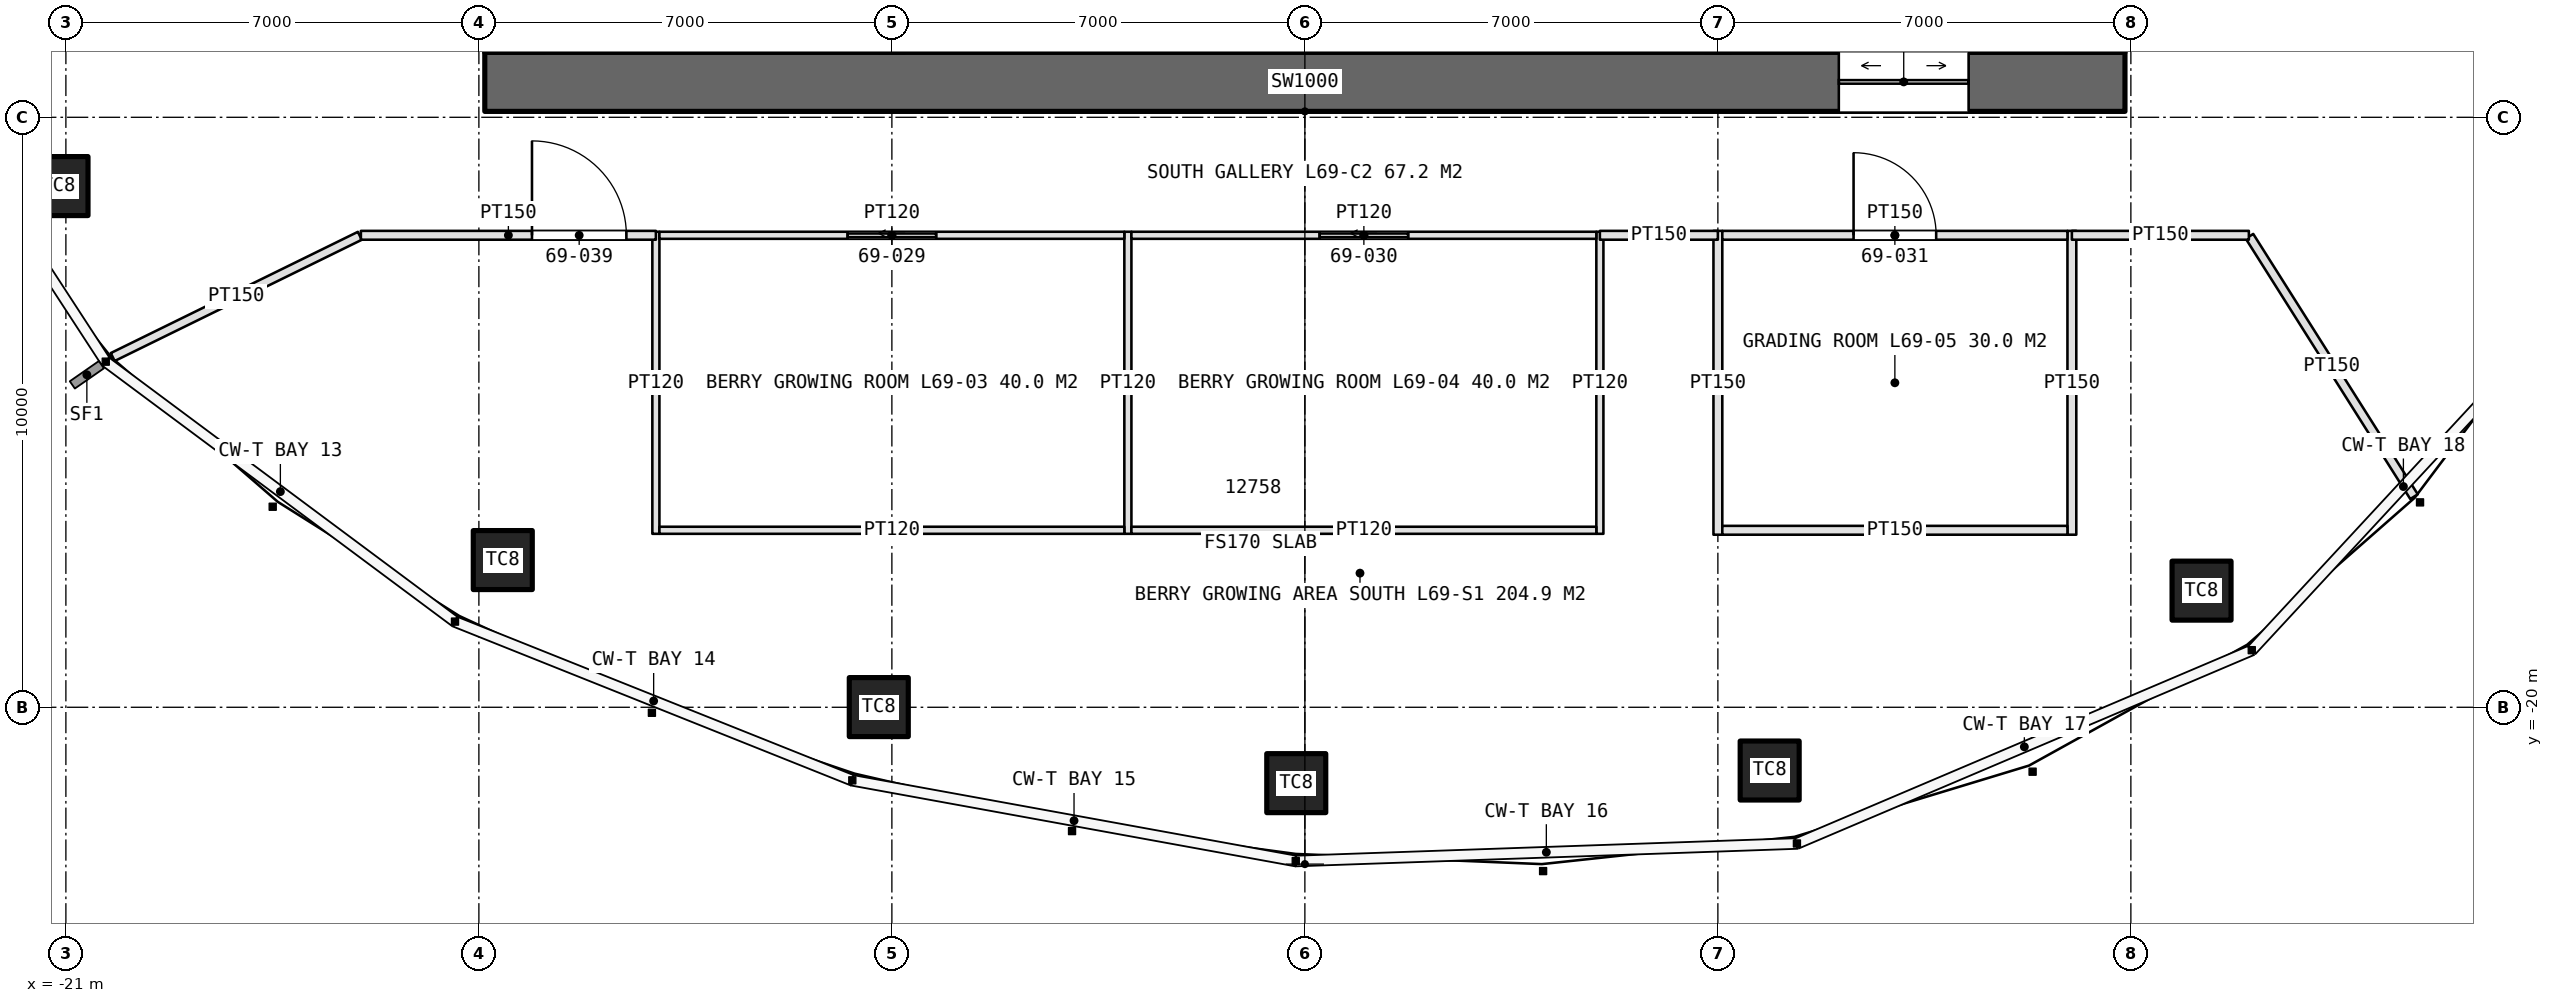
"""IFC4 building model, lengths in metres.
Left out: names, types, materials, properties, quantities, classifications, styles, units other than length and angle.
Written with IfcOpenShell. Run it as: python <this file> out.ifc"""

import sys

from ifc_helpers import new_model, si_unit, direction, frame, frame_2d, origin, origin_2d, place, context, subcontext, project, spatial, rectangle, extrude, element, fill, save


model = new_model("IFC4")
c1 = context("Model", 3, precision=1e-05, world=origin(), true_north=direction((0.0, 1.0)))
c2 = subcontext(c1, "Body", "Model", "MODEL_VIEW")
j1 = project(units=[si_unit("LENGTHUNIT", "METRE"), si_unit("PLANEANGLEUNIT", "RADIAN")], contexts=[c1])
p1 = place(None, origin())
s1 = spatial("IfcSite", under=j1, at=p1, CompositionType="ELEMENT")
p2 = place(p1, origin())
s2 = spatial("IfcBuilding", under=s1, at=p2, CompositionType="ELEMENT")
p3 = place(p2, frame((0.0, 0.0, 309.0)))
s3 = spatial("IfcBuildingStorey", under=s2, at=p3, CompositionType="ELEMENT", Elevation=309.0)
p4 = place(p3, frame((-13.9, -9.4, 0.0), z_axis=(0.0, 0.0, 1.0), x_axis=(1.0, 0.0, 0.0)))
e1 = element("IfcWall", 1, at=p4, inside=s3, PredefinedType="SHEAR", context=c2, shape_type="SweptSolid", body=[
    extrude(rectangle(XDim=27.8, YDim=1.0, at=frame_2d((13.9, 0.0))), origin(), (0.0, 0.0, 1.0), 4.2),
])
p5 = place(p4, frame((22.95, 0.0, 0.0)))
e2 = element("IfcOpeningElement", 2, at=p5, cuts=e1, PredefinedType="OPENING", context=c2, shape_type="SweptSolid", body=[
    extrude(rectangle(XDim=2.2, YDim=2.7, at=frame_2d((1.1, 1.35))), frame((0.0, 0.51, 0.0), z_axis=(0.0, -1.0, 0.0), x_axis=(1.0, 0.0, 0.0)), (0.0, 0.0, 1.0), 1.02),
])
for number, where, z_axis, x_axis in (
    (3, (-21.125, -11.166, 0.0), (0.0, 0.0, 1.0), (1.0, 0.0, 0.0)),
    (4, (-13.595, -17.505, 0.0), (0.0, 0.0, 1.0), (1.0, 0.0, 0.0)),
    (5, (-7.222, -19.997, 0.0), (0.0, 0.0, 1.0), (1.0, 0.0, 0.0)),
    (6, (-0.146, -21.286, 0.0), (0.0, 0.0, 1.0), (1.0, 0.0, 0.0)),
    (7, (7.878, -21.072, 0.0), (0.0, 0.0, 1.0), (1.0, 0.0, 0.0)),
    (8, (15.198, -18.023, 0.0), (0.0, 0.0, 1.0), (1.0, 0.0, 0.0)),
):
    element("IfcColumn", number, at=place(p3, frame(where, z_axis=z_axis, x_axis=x_axis)), inside=s3, PredefinedType="COLUMN", context=c2, shape_type="SweptSolid", body=[
        extrude(rectangle(XDim=1.0, YDim=1.0, at=origin_2d()), origin(), (0.0, 0.0, 1.0), 4.2),
    ])
for number, where, z_axis, x_axis in (
    (9, (-4.2, -4.7, 0.0), (0.0, 0.0, 1.0), (0.0, -1.0, 0.0)),
    (10, (-1.4, -4.7, 0.0), (0.0, 0.0, 1.0), (0.0, -1.0, 0.0)),
    (11, (1.4, -4.7, 0.0), (0.0, 0.0, 1.0), (0.0, -1.0, 0.0)),
    (12, (4.2, -4.7, 0.0), (0.0, 0.0, 1.0), (0.0, -1.0, 0.0)),
):
    element("IfcWall", number, at=place(p3, frame(where, z_axis=z_axis, x_axis=x_axis)), inside=s3, PredefinedType="PARTITIONING", context=c2, shape_type="SweptSolid", body=[
        extrude(rectangle(XDim=4.2, YDim=0.2, at=frame_2d((2.1, 0.0))), origin(), (0.0, 0.0, 1.0), 4.2),
    ])
for number, where, z_axis, x_axis in (
    (13, (-11.0, -11.94, 0.0), (0.0, 0.0, 1.0), (0.0, -1.0, 0.0)),
    (14, (-3.0, -11.94, 0.0), (0.0, 0.0, 1.0), (0.0, -1.0, 0.0)),
    (15, (5.0, -11.94, 0.0), (0.0, 0.0, 1.0), (0.0, -1.0, 0.0)),
):
    element("IfcWall", number, at=place(p3, frame(where, z_axis=z_axis, x_axis=x_axis)), inside=s3, PredefinedType="PARTITIONING", context=c2, shape_type="SweptSolid", body=[
        extrude(rectangle(XDim=5.12, YDim=0.12, at=frame_2d((2.56, 0.0))), origin(), (0.0, 0.0, 1.0), 3.0),
    ])
p6 = place(p3, frame((-10.94, -12.0, 0.0), z_axis=(0.0, 0.0, 1.0), x_axis=(1.0, 0.0, 0.0)))
e16 = element("IfcWall", 16, at=p6, inside=s3, PredefinedType="PARTITIONING", context=c2, shape_type="SweptSolid", body=[
    extrude(rectangle(XDim=7.88, YDim=0.12, at=frame_2d((3.94, 0.0))), origin(), (0.0, 0.0, 1.0), 3.0),
])
p7 = place(p6, frame((3.19, 0.0, 0.0)))
e17 = element("IfcOpeningElement", 17, at=p7, cuts=e16, PredefinedType="OPENING", context=c2, shape_type="SweptSolid", body=[
    extrude(rectangle(XDim=1.5, YDim=2.5, at=frame_2d((0.75, 1.25))), frame((0.0, 0.07, 0.0), z_axis=(0.0, -1.0, 0.0), x_axis=(1.0, 0.0, 0.0)), (0.0, 0.0, 1.0), 0.14),
])
p8 = place(p3, frame((-10.94, -17.0, 0.0), z_axis=(0.0, 0.0, 1.0), x_axis=(1.0, 0.0, 0.0)))
e18 = element("IfcWall", 18, at=p8, inside=s3, PredefinedType="PARTITIONING", context=c2, shape_type="SweptSolid", body=[
    extrude(rectangle(XDim=7.88, YDim=0.12, at=frame_2d((3.94, 0.0))), origin(), (0.0, 0.0, 1.0), 3.0),
])
p9 = place(p3, frame((-2.94, -12.0, 0.0), z_axis=(0.0, 0.0, 1.0), x_axis=(1.0, 0.0, 0.0)))
e19 = element("IfcWall", 19, at=p9, inside=s3, PredefinedType="PARTITIONING", context=c2, shape_type="SweptSolid", body=[
    extrude(rectangle(XDim=7.88, YDim=0.12, at=frame_2d((3.94, 0.0))), origin(), (0.0, 0.0, 1.0), 3.0),
])
p10 = place(p9, frame((3.19, 0.0, 0.0)))
e20 = element("IfcOpeningElement", 20, at=p10, cuts=e19, PredefinedType="OPENING", context=c2, shape_type="SweptSolid", body=[
    extrude(rectangle(XDim=1.5, YDim=2.5, at=frame_2d((0.75, 1.25))), frame((0.0, 0.07, 0.0), z_axis=(0.0, -1.0, 0.0), x_axis=(1.0, 0.0, 0.0)), (0.0, 0.0, 1.0), 0.14),
])
p11 = place(p3, frame((-2.94, -17.0, 0.0), z_axis=(0.0, 0.0, 1.0), x_axis=(1.0, 0.0, 0.0)))
e21 = element("IfcWall", 21, at=p11, inside=s3, PredefinedType="PARTITIONING", context=c2, shape_type="SweptSolid", body=[
    extrude(rectangle(XDim=7.88, YDim=0.12, at=frame_2d((3.94, 0.0))), origin(), (0.0, 0.0, 1.0), 3.0),
])
for number, where, z_axis, x_axis in (
    (22, (7.0, -11.925, 0.0), (0.0, 0.0, 1.0), (0.0, -1.0, 0.0)),
    (23, (13.0, -11.925, 0.0), (0.0, 0.0, 1.0), (0.0, -1.0, 0.0)),
):
    element("IfcWall", number, at=place(p3, frame(where, z_axis=z_axis, x_axis=x_axis)), inside=s3, PredefinedType="PARTITIONING", context=c2, shape_type="SweptSolid", body=[
        extrude(rectangle(XDim=5.15, YDim=0.15, at=frame_2d((2.575, 0.0))), origin(), (0.0, 0.0, 1.0), 3.0),
    ])
p12 = place(p3, frame((7.075, -12.0, 0.0), z_axis=(0.0, 0.0, 1.0), x_axis=(1.0, 0.0, 0.0)))
e24 = element("IfcWall", 24, at=p12, inside=s3, PredefinedType="PARTITIONING", context=c2, shape_type="SweptSolid", body=[
    extrude(rectangle(XDim=5.85, YDim=0.15, at=frame_2d((2.925, 0.0))), origin(), (0.0, 0.0, 1.0), 3.0),
])
p13 = place(p12, frame((2.225, 0.0, 0.0)))
e25 = element("IfcOpeningElement", 25, at=p13, cuts=e24, PredefinedType="OPENING", context=c2, shape_type="SweptSolid", body=[
    extrude(rectangle(XDim=1.4, YDim=2.4, at=frame_2d((0.7, 1.2))), frame((0.0, 0.085, 0.0), z_axis=(0.0, -1.0, 0.0), x_axis=(1.0, 0.0, 0.0)), (0.0, 0.0, 1.0), 0.17),
])
p14 = place(p3, frame((7.075, -17.0, 0.0), z_axis=(0.0, 0.0, 1.0), x_axis=(1.0, 0.0, 0.0)))
e26 = element("IfcWall", 26, at=p14, inside=s3, PredefinedType="PARTITIONING", context=c2, shape_type="SweptSolid", body=[
    extrude(rectangle(XDim=5.85, YDim=0.15, at=frame_2d((2.925, 0.0))), origin(), (0.0, 0.0, 1.0), 3.0),
])
p15 = place(p3, frame((-16.018, -12.009, 0.0), z_axis=(0.0, 0.0, 1.0), x_axis=(-0.897771840996, -0.440460805879, 0.0)))
e27 = element("IfcWall", 27, at=p15, inside=s3, PredefinedType="PARTITIONING", context=c2, shape_type="SweptSolid", body=[
    extrude(rectangle(XDim=4.666, YDim=0.15, at=frame_2d((2.333, 0.0))), origin(), (0.0, 0.0, 1.0), 3.0),
])
p16 = place(p3, frame((16.011, -12.017, 0.0), z_axis=(0.0, 0.0, 1.0), x_axis=(0.53415837449, -0.845384427916, 0.0)))
e28 = element("IfcWall", 28, at=p16, inside=s3, PredefinedType="PARTITIONING", context=c2, shape_type="SweptSolid", body=[
    extrude(rectangle(XDim=5.22, YDim=0.15, at=frame_2d((2.61, 0.0))), origin(), (0.0, 0.0, 1.0), 3.0),
])
p17 = place(p3, frame((-16.0, -12.0, 0.0), z_axis=(0.0, 0.0, 1.0), x_axis=(1.0, 0.0, 0.0)))
e29 = element("IfcWall", 29, at=p17, inside=s3, PredefinedType="PARTITIONING", context=c2, shape_type="SweptSolid", body=[
    extrude(rectangle(XDim=5.0, YDim=0.15, at=frame_2d((2.5, 0.0))), origin(), (0.0, 0.0, 1.0), 3.0),
])
p18 = place(p17, frame((2.9, 0.0, 0.0)))
e30 = element("IfcOpeningElement", 30, at=p18, cuts=e29, PredefinedType="OPENING", context=c2, shape_type="SweptSolid", body=[
    extrude(rectangle(XDim=1.6, YDim=2.4, at=frame_2d((0.8, 1.2))), frame((0.0, 0.085, 0.0), z_axis=(0.0, -1.0, 0.0), x_axis=(1.0, 0.0, 0.0)), (0.0, 0.0, 1.0), 0.17),
])
p19 = place(p3, frame((5.0, -12.0, 0.0), z_axis=(0.0, 0.0, 1.0), x_axis=(1.0, 0.0, 0.0)))
e31 = element("IfcWall", 31, at=p19, inside=s3, PredefinedType="PARTITIONING", context=c2, shape_type="SweptSolid", body=[
    extrude(rectangle(XDim=2.0, YDim=0.15, at=frame_2d((1.0, 0.0))), origin(), (0.0, 0.0, 1.0), 3.0),
])
p20 = place(p3, frame((13.0, -12.0, 0.0), z_axis=(0.0, 0.0, 1.0), x_axis=(1.0, 0.0, 0.0)))
e32 = element("IfcWall", 32, at=p20, inside=s3, PredefinedType="PARTITIONING", context=c2, shape_type="SweptSolid", body=[
    extrude(rectangle(XDim=3.0, YDim=0.15, at=frame_2d((1.5, 0.0))), origin(), (0.0, 0.0, 1.0), 3.0),
])
p21 = place(p5, origin())
e33 = element("IfcDoor", 33, at=p21, inside=s3, OperationType="DOUBLE_DOOR_SLIDING", PredefinedType="DOOR", context=c2, shape_type="SweptSolid", body=[
    extrude(rectangle(XDim=2.2, YDim=2.7, at=frame_2d((1.1, 1.35))), frame((0.0, 0.025, 0.0), z_axis=(0.0, -1.0, 0.0), x_axis=(1.0, 0.0, 0.0)), (0.0, 0.0, 1.0), 0.05),
])
fill(e2, e33)
p22 = place(p7, origin())
e34 = element("IfcDoor", 34, at=p22, inside=s3, OperationType="SLIDING_TO_LEFT", PredefinedType="DOOR", context=c2, shape_type="SweptSolid", body=[
    extrude(rectangle(XDim=1.5, YDim=2.5, at=frame_2d((0.75, 1.25))), frame((0.0, 0.025, 0.0), z_axis=(0.0, -1.0, 0.0), x_axis=(1.0, 0.0, 0.0)), (0.0, 0.0, 1.0), 0.05),
])
fill(e17, e34)
p23 = place(p10, origin())
e35 = element("IfcDoor", 35, at=p23, inside=s3, OperationType="SLIDING_TO_LEFT", PredefinedType="DOOR", context=c2, shape_type="SweptSolid", body=[
    extrude(rectangle(XDim=1.5, YDim=2.5, at=frame_2d((0.75, 1.25))), frame((0.0, 0.025, 0.0), z_axis=(0.0, -1.0, 0.0), x_axis=(1.0, 0.0, 0.0)), (0.0, 0.0, 1.0), 0.05),
])
fill(e20, e35)
p24 = place(p13, origin())
e36 = element("IfcDoor", 36, at=p24, inside=s3, OperationType="DOUBLE_DOOR_DOUBLE_SWING", PredefinedType="DOOR", context=c2, shape_type="SweptSolid", body=[
    extrude(rectangle(XDim=1.4, YDim=2.4, at=frame_2d((0.7, 1.2))), frame((0.0, 0.025, 0.0), z_axis=(0.0, -1.0, 0.0), x_axis=(1.0, 0.0, 0.0)), (0.0, 0.0, 1.0), 0.05),
])
fill(e25, e36)
p25 = place(p18, origin())
e37 = element("IfcDoor", 37, at=p25, inside=s3, OperationType="DOUBLE_DOOR_SINGLE_SWING", PredefinedType="DOOR", context=c2, shape_type="SweptSolid", body=[
    extrude(rectangle(XDim=1.6, YDim=2.4, at=frame_2d((0.8, 1.2))), frame((0.0, 0.025, 0.0), z_axis=(0.0, -1.0, 0.0), x_axis=(1.0, 0.0, 0.0)), (0.0, 0.0, 1.0), 0.05),
])
fill(e30, e37)
save(model, sys.argv[1])
